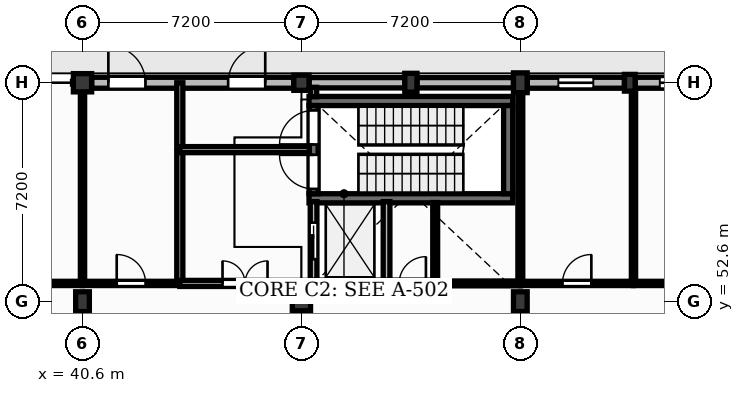
"""IFC4 building model, lengths in metres.
Left out: names, types, materials, properties, quantities, classifications, styles, units other than length and angle.
Written with IfcOpenShell. Run it as: python <this file> out.ifc"""

import sys

from ifc_helpers import new_model, si_unit, direction, frame, frame_2d, origin, origin_2d, place, context, subcontext, project, spatial, rectangle, extrude, element, fill, save


model = new_model("IFC4")
c1 = context("Model", 3, precision=1e-05, world=origin(), true_north=direction((0.0, 1.0)))
c2 = subcontext(c1, "Body", "Model", "MODEL_VIEW")
j1 = project(units=[si_unit("LENGTHUNIT", "METRE"), si_unit("PLANEANGLEUNIT", "RADIAN")], contexts=[c1])
p1 = place(None, origin())
s1 = spatial("IfcSite", under=j1, at=p1, CompositionType="ELEMENT")
p2 = place(p1, origin())
s2 = spatial("IfcBuilding", under=s1, at=p2, CompositionType="ELEMENT")
p3 = place(p2, origin())
s3 = spatial("IfcBuildingStorey", under=s2, at=p3, CompositionType="ELEMENT", Elevation=0.0)
p4 = place(p3, frame((40.6, 52.6, 0.0), z_axis=(0.0, 0.0, 1.0), x_axis=(1.0, 0.0, 0.0)))
e1 = element("IfcColumn", 1, at=p4, inside=s3, PredefinedType="COLUMN", context=c2, shape_type="SweptSolid", body=[
    extrude(rectangle(XDim=0.45, YDim=0.65, at=origin_2d()), origin(), (0.0, 0.0, 1.0), 4.2),
])
for number, where, z_axis, x_axis in (
    (2, (40.6, 59.8, 0.0), (0.0, 0.0, 1.0), (1.0, 0.0, 0.0)),
    (3, (47.8, 52.6, 0.0), (0.0, 0.0, 1.0), (1.0, 0.0, 0.0)),
):
    element("IfcColumn", number, at=place(p3, frame(where, z_axis=z_axis, x_axis=x_axis)), inside=s3, PredefinedType="COLUMN", context=c2, shape_type="SweptSolid", body=[
        extrude(rectangle(XDim=0.6, YDim=0.6, at=origin_2d()), origin(), (0.0, 0.0, 1.0), 4.2),
    ])
p5 = place(p3, frame((47.8, 59.8, 0.0), z_axis=(0.0, 0.0, 1.0), x_axis=(1.0, 0.0, 0.0)))
e4 = element("IfcColumn", 4, at=p5, inside=s3, PredefinedType="COLUMN", context=c2, shape_type="SweptSolid", body=[
    extrude(rectangle(XDim=0.5, YDim=0.5, at=origin_2d()), origin(), (0.0, 0.0, 1.0), 4.2),
])
for number, where, z_axis, x_axis in (
    (5, (55.0, 52.6, 0.0), (0.0, 0.0, 1.0), (1.0, 0.0, 0.0)),
    (6, (55.0, 59.8, 0.0), (0.0, 0.0, 1.0), (1.0, 0.0, 0.0)),
):
    element("IfcColumn", number, at=place(p3, frame(where, z_axis=z_axis, x_axis=x_axis)), inside=s3, PredefinedType="COLUMN", context=c2, shape_type="SweptSolid", body=[
        extrude(rectangle(XDim=0.45, YDim=0.65, at=origin_2d()), origin(), (0.0, 0.0, 1.0), 4.2),
    ])
p6 = place(p3, frame((51.4, 59.8, 0.0), z_axis=(0.0, 0.0, 1.0), x_axis=(1.0, 0.0, 0.0)))
e7 = element("IfcColumn", 7, at=p6, inside=s3, PredefinedType="PILASTER", context=c2, shape_type="SweptSolid", body=[
    extrude(rectangle(XDim=0.4, YDim=0.62, at=origin_2d()), origin(), (0.0, 0.0, 1.0), 4.2),
])
p7 = place(p3, frame((58.6, 59.8, 0.0), z_axis=(0.0, 0.0, 1.0), x_axis=(1.0, 0.0, 0.0)))
e8 = element("IfcColumn", 8, at=p7, inside=s3, PredefinedType="PILASTER", context=c2, shape_type="SweptSolid", body=[
    extrude(rectangle(XDim=0.35, YDim=0.55, at=origin_2d()), origin(), (0.0, 0.0, 1.0), 4.2),
])
p8 = place(p3, frame((40.9, 59.8, 0.0), z_axis=(0.0, 0.0, 1.0), x_axis=(1.0, 0.0, 0.0)))
e9 = element("IfcWall", 9, at=p8, inside=s3, PredefinedType="SOLIDWALL", context=c2, shape_type="SweptSolid", body=[
    extrude(rectangle(XDim=6.65, YDim=0.36, at=frame_2d((3.325, 0.0))), origin(), (0.0, 0.0, 1.0), 3.68),
])
p9 = place(p8, frame((0.55, 0.0, 0.0)))
e10 = element("IfcOpeningElement", 10, at=p9, cuts=e9, PredefinedType="OPENING", context=c2, shape_type="SweptSolid", body=[
    extrude(rectangle(XDim=1.22, YDim=2.2, at=frame_2d((0.61, 1.1))), frame((0.0, 0.19, 0.0), z_axis=(0.0, -1.0, 0.0), x_axis=(1.0, 0.0, 0.0)), (0.0, 0.0, 1.0), 0.38),
])
p10 = place(p8, frame((4.49, 0.0, 0.0)))
e11 = element("IfcOpeningElement", 11, at=p10, cuts=e9, PredefinedType="OPENING", context=c2, shape_type="SweptSolid", body=[
    extrude(rectangle(XDim=1.22, YDim=2.2, at=frame_2d((0.61, 1.1))), frame((0.0, 0.19, 0.0), z_axis=(0.0, -1.0, 0.0), x_axis=(1.0, 0.0, 0.0)), (0.0, 0.0, 1.0), 0.38),
])
p11 = place(p3, frame((48.05, 59.8, 0.0), z_axis=(0.0, 0.0, 1.0), x_axis=(1.0, 0.0, 0.0)))
e12 = element("IfcWall", 12, at=p11, inside=s3, PredefinedType="SOLIDWALL", context=c2, shape_type="SweptSolid", body=[
    extrude(rectangle(XDim=3.15, YDim=0.34, at=frame_2d((1.575, 0.0))), origin(), (0.0, 0.0, 1.0), 3.68),
])
p12 = place(p3, frame((51.6, 59.8, 0.0), z_axis=(0.0, 0.0, 1.0), x_axis=(1.0, 0.0, 0.0)))
e13 = element("IfcWall", 13, at=p12, inside=s3, PredefinedType="SOLIDWALL", context=c2, shape_type="SweptSolid", body=[
    extrude(rectangle(XDim=3.175, YDim=0.34, at=frame_2d((1.587, 0.0))), origin(), (0.0, 0.0, 1.0), 3.68),
])
p13 = place(p3, frame((55.225, 59.8, 0.0), z_axis=(0.0, 0.0, 1.0), x_axis=(1.0, 0.0, 0.0)))
e14 = element("IfcWall", 14, at=p13, inside=s3, PredefinedType="SOLIDWALL", context=c2, shape_type="SweptSolid", body=[
    extrude(rectangle(XDim=3.2, YDim=0.36, at=frame_2d((1.6, 0.0))), origin(), (0.0, 0.0, 1.0), 3.68),
])
p14 = place(p13, frame((1.025, 0.0, 1.5)))
e15 = element("IfcOpeningElement", 15, at=p14, cuts=e14, PredefinedType="OPENING", context=c2, shape_type="SweptSolid", body=[
    extrude(rectangle(XDim=1.15, YDim=1.25, at=frame_2d((0.575, 0.625))), frame((0.0, 0.19, 0.0), z_axis=(0.0, -1.0, 0.0), x_axis=(1.0, 0.0, 0.0)), (0.0, 0.0, 1.0), 0.38),
])
p15 = place(p3, frame((58.775, 59.8, 0.0), z_axis=(0.0, 0.0, 1.0), x_axis=(1.0, 0.0, 0.0)))
e16 = element("IfcWall", 16, at=p15, inside=s3, PredefinedType="SOLIDWALL", context=c2, shape_type="SweptSolid", body=[
    extrude(rectangle(XDim=3.125, YDim=0.36, at=frame_2d((1.562, 0.0))), origin(), (0.0, 0.0, 1.0), 3.68),
])
p16 = place(p15, frame((0.812, 0.0, 1.5)))
e17 = element("IfcOpeningElement", 17, at=p16, cuts=e16, PredefinedType="OPENING", context=c2, shape_type="SweptSolid", body=[
    extrude(rectangle(XDim=1.5, YDim=1.25, at=frame_2d((0.75, 0.625))), frame((0.0, 0.19, 0.0), z_axis=(0.0, -1.0, 0.0), x_axis=(1.0, 0.0, 0.0)), (0.0, 0.0, 1.0), 0.38),
])
for number, where, z_axis, x_axis in (
    (18, (48.05, 56.0, 0.0), (0.0, 0.0, 1.0), (1.0, 0.0, 0.0)),
    (19, (48.05, 59.2, 0.0), (0.0, 0.0, 1.0), (1.0, 0.0, 0.0)),
):
    element("IfcWall", number, at=place(p3, frame(where, z_axis=z_axis, x_axis=x_axis)), inside=s3, PredefinedType="SHEAR", context=c2, shape_type="SweptSolid", body=[
        extrude(rectangle(XDim=6.7, YDim=0.3, at=frame_2d((3.35, 0.0))), origin(), (0.0, 0.0, 1.0), 4.25),
    ])
p17 = place(p3, frame((48.2, 56.15, 0.0), z_axis=(0.0, 0.0, 1.0), x_axis=(0.0, 1.0, 0.0)))
e20 = element("IfcWall", 20, at=p17, inside=s3, PredefinedType="SHEAR", context=c2, shape_type="SweptSolid", body=[
    extrude(rectangle(XDim=2.9, YDim=0.3, at=frame_2d((1.45, 0.0))), origin(), (0.0, 0.0, 1.0), 4.25),
])
p18 = place(p17, frame((1.62, 0.0, 0.0)))
e21 = element("IfcOpeningElement", 21, at=p18, cuts=e20, PredefinedType="OPENING", context=c2, shape_type="SweptSolid", body=[
    extrude(rectangle(XDim=1.12, YDim=2.1, at=frame_2d((0.56, 1.05))), frame((0.0, 0.16, 0.0), z_axis=(0.0, -1.0, 0.0), x_axis=(1.0, 0.0, 0.0)), (0.0, 0.0, 1.0), 0.32),
])
p19 = place(p17, frame((0.16, 0.0, 0.0)))
e22 = element("IfcOpeningElement", 22, at=p19, cuts=e20, PredefinedType="OPENING", context=c2, shape_type="SweptSolid", body=[
    extrude(rectangle(XDim=1.12, YDim=2.1, at=frame_2d((0.56, 1.05))), frame((0.0, 0.16, 0.0), z_axis=(0.0, -1.0, 0.0), x_axis=(1.0, 0.0, 0.0)), (0.0, 0.0, 1.0), 0.32),
])
p20 = place(p3, frame((54.6, 56.15, 0.0), z_axis=(0.0, 0.0, 1.0), x_axis=(0.0, 1.0, 0.0)))
e23 = element("IfcWall", 23, at=p20, inside=s3, PredefinedType="SHEAR", context=c2, shape_type="SweptSolid", body=[
    extrude(rectangle(XDim=2.9, YDim=0.3, at=frame_2d((1.45, 0.0))), origin(), (0.0, 0.0, 1.0), 4.25),
])
p21 = place(p3, frame((48.2, 53.2, 0.0), z_axis=(0.0, 0.0, 1.0), x_axis=(1.0, 0.0, 0.0)))
e24 = element("IfcWall", 24, at=p21, inside=s3, PredefinedType="SOLIDWALL", context=c2, shape_type="SweptSolid", body=[
    extrude(rectangle(XDim=2.4, YDim=0.22, at=frame_2d((1.2, 0.0))), origin(), (0.0, 0.0, 1.0), 4.25),
])
p22 = place(p3, frame((48.2, 53.31, 0.0), z_axis=(0.0, 0.0, 1.0), x_axis=(0.0, 1.0, 0.0)))
e25 = element("IfcWall", 25, at=p22, inside=s3, PredefinedType="SOLIDWALL", context=c2, shape_type="SweptSolid", body=[
    extrude(rectangle(XDim=2.58, YDim=0.22, at=frame_2d((1.29, 0.0))), origin(), (0.0, 0.0, 1.0), 4.25),
])
p23 = place(p22, frame((0.69, 0.0, 0.0)))
e26 = element("IfcOpeningElement", 26, at=p23, cuts=e25, PredefinedType="OPENING", context=c2, shape_type="SweptSolid", body=[
    extrude(rectangle(XDim=1.2, YDim=2.15, at=frame_2d((0.6, 1.075))), frame((0.0, 0.12, 0.0), z_axis=(0.0, -1.0, 0.0), x_axis=(1.0, 0.0, 0.0)), (0.0, 0.0, 1.0), 0.24),
])
p24 = place(p3, frame((50.6, 53.31, 0.0), z_axis=(0.0, 0.0, 1.0), x_axis=(0.0, 1.0, 0.0)))
e27 = element("IfcWall", 27, at=p24, inside=s3, PredefinedType="SOLIDWALL", context=c2, shape_type="SweptSolid", body=[
    extrude(rectangle(XDim=2.58, YDim=0.22, at=frame_2d((1.29, 0.0))), origin(), (0.0, 0.0, 1.0), 4.25),
])
p25 = place(p3, frame((33.4, 53.2, 0.0), z_axis=(0.0, 0.0, 1.0), x_axis=(1.0, 0.0, 0.0)))
e28 = element("IfcWall", 28, at=p25, inside=s3, PredefinedType="PARTITIONING", context=c2, shape_type="SweptSolid", body=[
    extrude(rectangle(XDim=7.2, YDim=0.14, at=frame_2d((3.6, 0.0))), origin(), (0.0, 0.0, 1.0), 4.18),
])
p26 = place(p25, frame((2.83, 0.0, 0.0)))
e29 = element("IfcOpeningElement", 29, at=p26, cuts=e28, PredefinedType="OPENING", context=c2, shape_type="SweptSolid", body=[
    extrude(rectangle(XDim=1.54, YDim=2.25, at=frame_2d((0.77, 1.125))), frame((0.0, 0.08, 0.0), z_axis=(0.0, -1.0, 0.0), x_axis=(1.0, 0.0, 0.0)), (0.0, 0.0, 1.0), 0.16),
])
p27 = place(p3, frame((40.6, 53.27, 0.0), z_axis=(0.0, 0.0, 1.0), x_axis=(0.0, 1.0, 0.0)))
e30 = element("IfcWall", 30, at=p27, inside=s3, PredefinedType="PARTITIONING", context=c2, shape_type="SweptSolid", body=[
    extrude(rectangle(XDim=6.23, YDim=0.14, at=frame_2d((3.115, 0.0))), origin(), (0.0, 0.0, 1.0), 3.5),
])
p28 = place(p3, frame((40.6, 53.2, 0.0), z_axis=(0.0, 0.0, 1.0), x_axis=(1.0, 0.0, 0.0)))
e31 = element("IfcWall", 31, at=p28, inside=s3, PredefinedType="PARTITIONING", context=c2, shape_type="SweptSolid", body=[
    extrude(rectangle(XDim=3.2, YDim=0.14, at=frame_2d((1.6, 0.0))), origin(), (0.0, 0.0, 1.0), 4.18),
])
p29 = place(p28, frame((1.125, 0.0, 0.0)))
e32 = element("IfcOpeningElement", 32, at=p29, cuts=e31, PredefinedType="OPENING", context=c2, shape_type="SweptSolid", body=[
    extrude(rectangle(XDim=0.95, YDim=2.1, at=frame_2d((0.475, 1.05))), frame((0.0, 0.08, 0.0), z_axis=(0.0, -1.0, 0.0), x_axis=(1.0, 0.0, 0.0)), (0.0, 0.0, 1.0), 0.16),
])
p30 = place(p3, frame((43.8, 53.27, 0.0), z_axis=(0.0, 0.0, 1.0), x_axis=(0.0, 1.0, 0.0)))
e33 = element("IfcWall", 33, at=p30, inside=s3, PredefinedType="PARTITIONING", context=c2, shape_type="SweptSolid", body=[
    extrude(rectangle(XDim=4.26, YDim=0.2, at=frame_2d((2.13, 0.0))), origin(), (0.0, 0.0, 1.0), 4.18),
])
p31 = place(p3, frame((43.8, 53.2, 0.0), z_axis=(0.0, 0.0, 1.0), x_axis=(1.0, 0.0, 0.0)))
e34 = element("IfcWall", 34, at=p31, inside=s3, PredefinedType="PARTITIONING", context=c2, shape_type="SweptSolid", body=[
    extrude(rectangle(XDim=4.29, YDim=0.2, at=frame_2d((2.145, 0.0))), origin(), (0.0, 0.0, 1.0), 4.18),
])
p32 = place(p31, frame((1.405, 0.0, 0.0)))
e35 = element("IfcOpeningElement", 35, at=p32, cuts=e34, PredefinedType="OPENING", context=c2, shape_type="SweptSolid", body=[
    extrude(rectangle(XDim=1.48, YDim=2.25, at=frame_2d((0.74, 1.125))), frame((0.0, 0.11, 0.0), z_axis=(0.0, -1.0, 0.0), x_axis=(1.0, 0.0, 0.0)), (0.0, 0.0, 1.0), 0.22),
])
p33 = place(p3, frame((43.8, 57.67, 0.0), z_axis=(0.0, 0.0, 1.0), x_axis=(0.0, 1.0, 0.0)))
e36 = element("IfcWall", 36, at=p33, inside=s3, PredefinedType="PARTITIONING", context=c2, shape_type="SweptSolid", body=[
    extrude(rectangle(XDim=2.13, YDim=0.2, at=frame_2d((1.065, 0.0))), origin(), (0.0, 0.0, 1.0), 4.18),
])
p34 = place(p3, frame((43.8, 57.6, 0.0), z_axis=(0.0, 0.0, 1.0), x_axis=(1.0, 0.0, 0.0)))
e37 = element("IfcWall", 37, at=p34, inside=s3, PredefinedType="PARTITIONING", context=c2, shape_type="SweptSolid", body=[
    extrude(rectangle(XDim=4.26, YDim=0.2, at=frame_2d((2.13, 0.0))), origin(), (0.0, 0.0, 1.0), 4.18),
])
p35 = place(p3, frame((50.71, 53.2, 0.0), z_axis=(0.0, 0.0, 1.0), x_axis=(1.0, 0.0, 0.0)))
e38 = element("IfcWall", 38, at=p35, inside=s3, PredefinedType="SOLIDWALL", context=c2, shape_type="SweptSolid", body=[
    extrude(rectangle(XDim=1.49, YDim=0.22, at=frame_2d((0.745, 0.0))), origin(), (0.0, 0.0, 1.0), 4.18),
])
p36 = place(p35, frame((0.305, 0.0, 0.0)))
e39 = element("IfcOpeningElement", 39, at=p36, cuts=e38, PredefinedType="OPENING", context=c2, shape_type="SweptSolid", body=[
    extrude(rectangle(XDim=0.88, YDim=2.05, at=frame_2d((0.44, 1.025))), frame((0.0, 0.12, 0.0), z_axis=(0.0, -1.0, 0.0), x_axis=(1.0, 0.0, 0.0)), (0.0, 0.0, 1.0), 0.24),
])
p37 = place(p3, frame((55.0, 53.2, 0.0), z_axis=(0.0, 0.0, 1.0), x_axis=(1.0, 0.0, 0.0)))
e40 = element("IfcWall", 40, at=p37, inside=s3, PredefinedType="PARTITIONING", context=c2, shape_type="SweptSolid", body=[
    extrude(rectangle(XDim=3.722, YDim=0.14, at=frame_2d((1.861, 0.0))), origin(), (0.0, 0.0, 1.0), 4.18),
])
p38 = place(p37, frame((1.386, 0.0, 0.0)))
e41 = element("IfcOpeningElement", 41, at=p38, cuts=e40, PredefinedType="OPENING", context=c2, shape_type="SweptSolid", body=[
    extrude(rectangle(XDim=0.95, YDim=2.1, at=frame_2d((0.475, 1.05))), frame((0.0, 0.08, 0.0), z_axis=(0.0, -1.0, 0.0), x_axis=(1.0, 0.0, 0.0)), (0.0, 0.0, 1.0), 0.16),
])
p39 = place(p3, frame((58.722, 53.27, 0.0), z_axis=(0.0, 0.0, 1.0), x_axis=(0.0, 1.0, 0.0)))
e42 = element("IfcWall", 42, at=p39, inside=s3, PredefinedType="PARTITIONING", context=c2, shape_type="SweptSolid", body=[
    extrude(rectangle(XDim=6.255, YDim=0.14, at=frame_2d((3.127, 0.0))), origin(), (0.0, 0.0, 1.0), 4.18),
])
p40 = place(p3, frame((58.722, 53.2, 0.0), z_axis=(0.0, 0.0, 1.0), x_axis=(1.0, 0.0, 0.0)))
e43 = element("IfcWall", 43, at=p40, inside=s3, PredefinedType="PARTITIONING", context=c2, shape_type="SweptSolid", body=[
    extrude(rectangle(XDim=3.478, YDim=0.14, at=frame_2d((1.739, 0.0))), origin(), (0.0, 0.0, 1.0), 4.18),
])
p41 = place(p40, frame((1.249, 0.0, 0.0)))
e44 = element("IfcOpeningElement", 44, at=p41, cuts=e43, PredefinedType="OPENING", context=c2, shape_type="SweptSolid", body=[
    extrude(rectangle(XDim=0.98, YDim=2.15, at=frame_2d((0.49, 1.075))), frame((0.0, 0.08, 0.0), z_axis=(0.0, -1.0, 0.0), x_axis=(1.0, 0.0, 0.0)), (0.0, 0.0, 1.0), 0.16),
])
p42 = place(p3, frame((52.2, 53.27, 0.0), z_axis=(0.0, 0.0, 1.0), x_axis=(0.0, 1.0, 0.0)))
e45 = element("IfcWall", 45, at=p42, inside=s3, PredefinedType="PARTITIONING", context=c2, shape_type="SweptSolid", body=[
    extrude(rectangle(XDim=2.59, YDim=0.16, at=frame_2d((1.295, 0.0))), origin(), (0.0, 0.0, 1.0), 4.18),
])
p43 = place(p3, frame((48.2, 59.34, 0.0), z_axis=(0.0, 0.0, 1.0), x_axis=(0.0, 1.0, 0.0)))
e46 = element("IfcWall", 46, at=p43, inside=s3, PredefinedType="PARTITIONING", context=c2, shape_type="SweptSolid", body=[
    extrude(rectangle(XDim=0.31, YDim=0.2, at=frame_2d((0.155, 0.0))), origin(), (0.0, 0.0, 1.0), 4.18),
])
p44 = place(p3, frame((55.0, 53.2, 0.0), z_axis=(0.0, 0.0, 1.0), x_axis=(-1.0, 0.0, 0.0)))
e47 = element("IfcWall", 47, at=p44, inside=s3, PredefinedType="PARTITIONING", context=c2, shape_type="SweptSolid", body=[
    extrude(rectangle(XDim=2.8, YDim=0.16, at=frame_2d((1.4, 0.0))), origin(), (0.0, 0.0, 1.0), 4.18),
])
p45 = place(p3, frame((55.0, 53.27, 0.0), z_axis=(0.0, 0.0, 1.0), x_axis=(0.0, 1.0, 0.0)))
e48 = element("IfcWall", 48, at=p45, inside=s3, PredefinedType="PARTITIONING", context=c2, shape_type="SweptSolid", body=[
    extrude(rectangle(XDim=6.205, YDim=0.16, at=frame_2d((3.103, 0.0))), origin(), (0.0, 0.0, 1.0), 3.5),
])
p46 = place(p9, origin())
e49 = element("IfcDoor", 49, at=p46, inside=s3, OperationType="SINGLE_SWING_LEFT", PredefinedType="DOOR", context=c2, shape_type="SweptSolid", body=[
    extrude(rectangle(XDim=1.22, YDim=2.2, at=frame_2d((0.61, 1.1))), frame((0.0, 0.025, 0.0), z_axis=(0.0, -1.0, 0.0), x_axis=(1.0, 0.0, 0.0)), (0.0, 0.0, 1.0), 0.05),
])
fill(e10, e49)
p47 = place(p10, origin())
e50 = element("IfcDoor", 50, at=p47, inside=s3, OperationType="SINGLE_SWING_RIGHT", PredefinedType="DOOR", context=c2, shape_type="SweptSolid", body=[
    extrude(rectangle(XDim=1.22, YDim=2.2, at=frame_2d((0.61, 1.1))), frame((0.0, 0.025, 0.0), z_axis=(0.0, -1.0, 0.0), x_axis=(1.0, 0.0, 0.0)), (0.0, 0.0, 1.0), 0.05),
])
fill(e11, e50)
p48 = place(p14, origin())
e51 = element("IfcWindow", 51, at=p48, inside=s3, PartitioningType="SINGLE_PANEL", PredefinedType="WINDOW", context=c2, shape_type="SweptSolid", body=[
    extrude(rectangle(XDim=1.15, YDim=1.25, at=frame_2d((0.575, 0.625))), frame((0.0, 0.03, 0.0), z_axis=(0.0, -1.0, 0.0), x_axis=(1.0, 0.0, 0.0)), (0.0, 0.0, 1.0), 0.06),
])
fill(e15, e51)
p49 = place(p16, origin())
e52 = element("IfcWindow", 52, at=p49, inside=s3, PartitioningType="DOUBLE_PANEL_VERTICAL", PredefinedType="WINDOW", context=c2, shape_type="SweptSolid", body=[
    extrude(rectangle(XDim=1.5, YDim=1.25, at=frame_2d((0.75, 0.625))), frame((0.0, 0.03, 0.0), z_axis=(0.0, -1.0, 0.0), x_axis=(1.0, 0.0, 0.0)), (0.0, 0.0, 1.0), 0.06),
])
fill(e17, e52)
p50 = place(p23, origin())
e53 = element("IfcDoor", 53, at=p50, inside=s3, OperationType="SLIDING_TO_LEFT", PredefinedType="DOOR", context=c2, shape_type="SweptSolid", body=[
    extrude(rectangle(XDim=1.2, YDim=2.15, at=frame_2d((0.6, 1.075))), frame((0.0, 0.025, 0.0), z_axis=(0.0, -1.0, 0.0), x_axis=(1.0, 0.0, 0.0)), (0.0, 0.0, 1.0), 0.05),
])
fill(e26, e53)
p51 = place(p18, origin())
e54 = element("IfcDoor", 54, at=p51, inside=s3, OperationType="SINGLE_SWING_LEFT", PredefinedType="DOOR", context=c2, shape_type="SweptSolid", body=[
    extrude(rectangle(XDim=1.12, YDim=2.1, at=frame_2d((0.56, 1.05))), frame((0.0, 0.025, 0.0), z_axis=(0.0, -1.0, 0.0), x_axis=(1.0, 0.0, 0.0)), (0.0, 0.0, 1.0), 0.05),
])
fill(e21, e54)
p52 = place(p19, origin())
e55 = element("IfcDoor", 55, at=p52, inside=s3, OperationType="SINGLE_SWING_RIGHT", PredefinedType="DOOR", context=c2, shape_type="SweptSolid", body=[
    extrude(rectangle(XDim=1.12, YDim=2.1, at=frame_2d((0.56, 1.05))), frame((0.0, 0.025, 0.0), z_axis=(0.0, -1.0, 0.0), x_axis=(1.0, 0.0, 0.0)), (0.0, 0.0, 1.0), 0.05),
])
fill(e22, e55)
p53 = place(p32, origin())
e56 = element("IfcDoor", 56, at=p53, inside=s3, OperationType="DOUBLE_DOOR_SINGLE_SWING", PredefinedType="DOOR", context=c2, shape_type="SweptSolid", body=[
    extrude(rectangle(XDim=1.48, YDim=2.25, at=frame_2d((0.74, 1.125))), frame((0.0, 0.025, 0.0), z_axis=(0.0, -1.0, 0.0), x_axis=(1.0, 0.0, 0.0)), (0.0, 0.0, 1.0), 0.05),
])
fill(e35, e56)
p54 = place(p36, origin())
e57 = element("IfcDoor", 57, at=p54, inside=s3, OperationType="SINGLE_SWING_RIGHT", PredefinedType="DOOR", context=c2, shape_type="SweptSolid", body=[
    extrude(rectangle(XDim=0.88, YDim=2.05, at=frame_2d((0.44, 1.025))), frame((0.0, 0.025, 0.0), z_axis=(0.0, -1.0, 0.0), x_axis=(1.0, 0.0, 0.0)), (0.0, 0.0, 1.0), 0.05),
])
fill(e39, e57)
p55 = place(p29, origin())
e58 = element("IfcDoor", 58, at=p55, inside=s3, OperationType="SINGLE_SWING_LEFT", PredefinedType="DOOR", context=c2, shape_type="SweptSolid", body=[
    extrude(rectangle(XDim=0.95, YDim=2.1, at=frame_2d((0.475, 1.05))), frame((0.0, 0.025, 0.0), z_axis=(0.0, -1.0, 0.0), x_axis=(1.0, 0.0, 0.0)), (0.0, 0.0, 1.0), 0.05),
])
fill(e32, e58)
p56 = place(p38, origin())
e59 = element("IfcDoor", 59, at=p56, inside=s3, OperationType="SINGLE_SWING_RIGHT", PredefinedType="DOOR", context=c2, shape_type="SweptSolid", body=[
    extrude(rectangle(XDim=0.95, YDim=2.1, at=frame_2d((0.475, 1.05))), frame((0.0, 0.025, 0.0), z_axis=(0.0, -1.0, 0.0), x_axis=(1.0, 0.0, 0.0)), (0.0, 0.0, 1.0), 0.05),
])
fill(e41, e59)
save(model, sys.argv[1])
